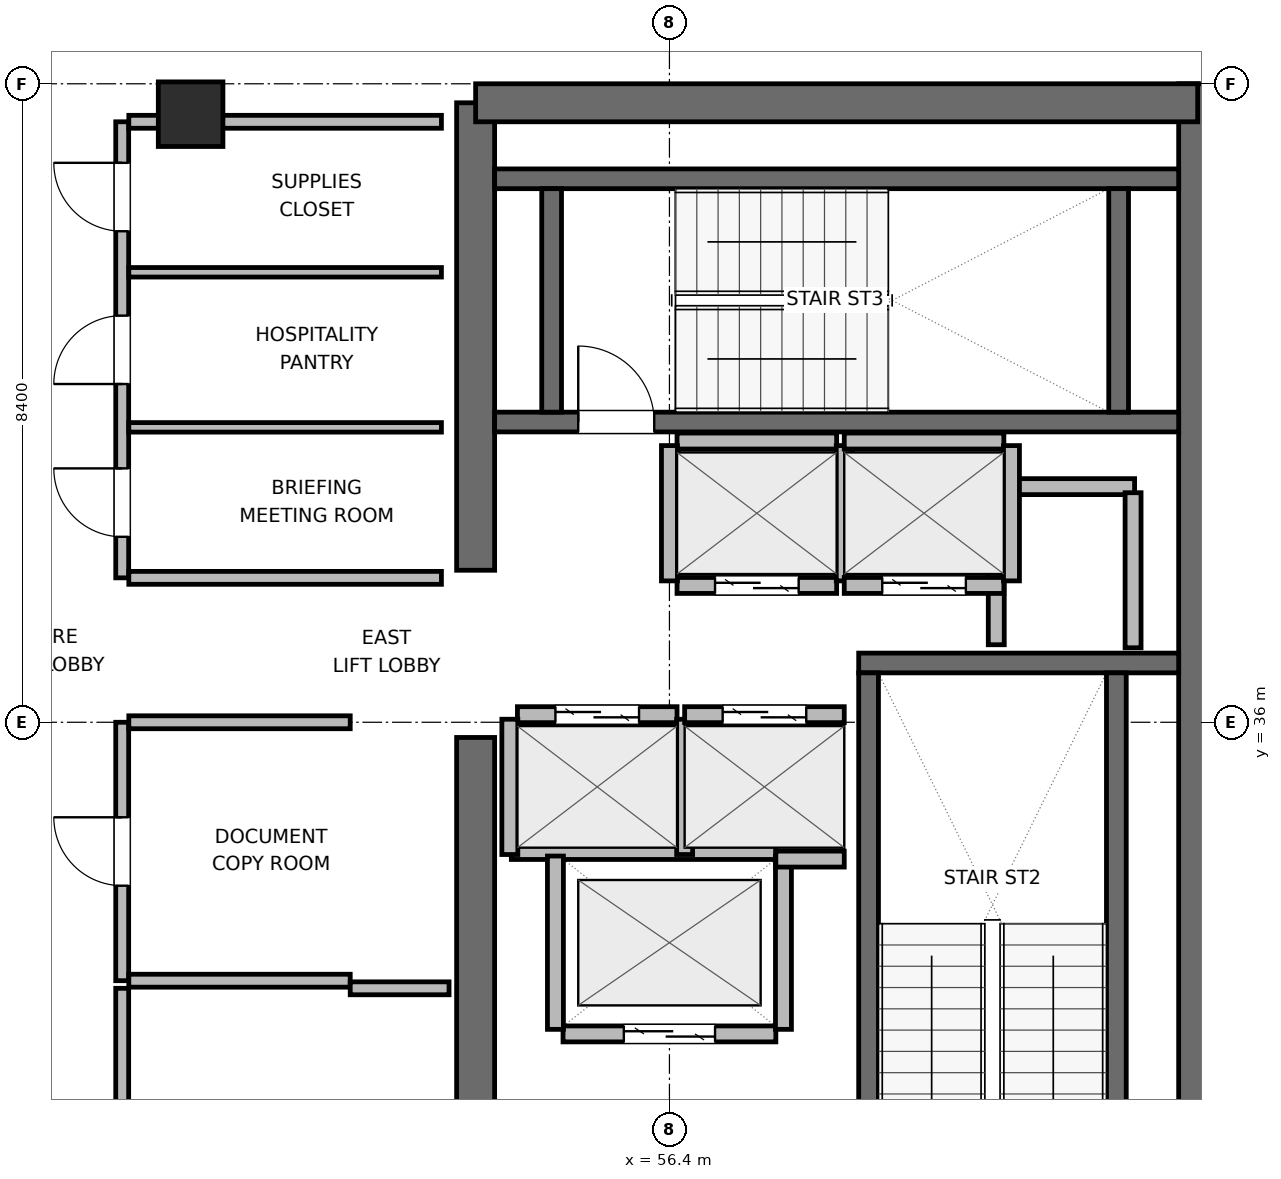
"""IFC4 building model, lengths in metres.
Left out: names, types, materials, properties, quantities, classifications, styles, units other than length and angle.
Written with IfcOpenShell. Run it as: python <this file> out.ifc"""

import sys

from ifc_helpers import new_model, si_unit, direction, frame, frame_2d, origin, origin_2d, place, context, subcontext, project, spatial, rectangle, extrude, element, fill, save


model = new_model("IFC4")
c1 = context("Model", 3, precision=1e-05, world=origin(), true_north=direction((0.0, 1.0)))
c2 = subcontext(c1, "Body", "Model", "MODEL_VIEW")
j1 = project(units=[si_unit("LENGTHUNIT", "METRE"), si_unit("PLANEANGLEUNIT", "RADIAN")], contexts=[c1])
p1 = place(None, origin())
s1 = spatial("IfcSite", under=j1, at=p1, CompositionType="ELEMENT")
p2 = place(p1, origin())
s2 = spatial("IfcBuilding", under=s1, at=p2, CompositionType="ELEMENT")
p3 = place(p2, frame((0.0, 0.0, 302.4)))
s3 = spatial("IfcBuildingStorey", under=s2, at=p3, CompositionType="ELEMENT", Elevation=302.4)
p4 = place(p3, frame((53.85, 27.85, 0.0), z_axis=(0.0, 0.0, 1.0), x_axis=(0.0, 1.0, 0.0)))
e1 = element("IfcWall", 1, at=p4, inside=s3, PredefinedType="SHEAR", context=c2, shape_type="SweptSolid", body=[
    extrude(rectangle(XDim=7.95, YDim=0.5, at=frame_2d((3.975, 0.0))), origin(), (0.0, 0.0, 1.0), 3.9),
])
p5 = place(p3, frame((53.85, 38.0, 0.0), z_axis=(0.0, 0.0, 1.0), x_axis=(0.0, 1.0, 0.0)))
e2 = element("IfcWall", 2, at=p5, inside=s3, PredefinedType="SHEAR", context=c2, shape_type="SweptSolid", body=[
    extrude(rectangle(XDim=6.15, YDim=0.5, at=frame_2d((3.075, 0.0))), origin(), (0.0, 0.0, 1.0), 3.9),
])
p6 = place(p3, frame((63.35, 27.6, 0.0), z_axis=(0.0, 0.0, 1.0), x_axis=(0.0, 1.0, 0.0)))
e3 = element("IfcWall", 3, at=p6, inside=s3, PredefinedType="SHEAR", context=c2, shape_type="SweptSolid", body=[
    extrude(rectangle(XDim=16.8, YDim=0.5, at=frame_2d((8.4, 0.0))), origin(), (0.0, 0.0, 1.0), 3.9),
])
p7 = place(p3, frame((53.85, 44.15, 0.0), z_axis=(0.0, 0.0, 1.0), x_axis=(1.0, 0.0, 0.0)))
e4 = element("IfcWall", 4, at=p7, inside=s3, PredefinedType="SHEAR", context=c2, shape_type="SweptSolid", body=[
    extrude(rectangle(XDim=9.5, YDim=0.5, at=frame_2d((4.75, 0.0))), origin(), (0.0, 0.0, 1.0), 3.9),
])
p8 = place(p3, frame((58.89, 36.78, 0.0), z_axis=(0.0, 0.0, 1.0), x_axis=(1.0, 0.0, 0.0)))
e5 = element("IfcWall", 5, at=p8, inside=s3, PredefinedType="SHEAR", context=c2, shape_type="SweptSolid", body=[
    extrude(rectangle(XDim=4.21, YDim=0.26, at=frame_2d((2.105, 0.0))), origin(), (0.0, 0.0, 1.0), 3.9),
])
p9 = place(p3, frame((59.02, 29.05, 0.0), z_axis=(0.0, 0.0, 1.0), x_axis=(0.0, 1.0, 0.0)))
e6 = element("IfcWall", 6, at=p9, inside=s3, PredefinedType="SHEAR", context=c2, shape_type="SweptSolid", body=[
    extrude(rectangle(XDim=7.6, YDim=0.26, at=frame_2d((3.8, 0.0))), origin(), (0.0, 0.0, 1.0), 3.9),
])
p10 = place(p9, frame((0.3, 0.0, 0.0)))
e7 = element("IfcOpeningElement", 7, at=p10, cuts=e6, PredefinedType="OPENING", context=c2, shape_type="SweptSolid", body=[
    extrude(rectangle(XDim=1.0, YDim=2.04, at=frame_2d((0.5, 1.02))), frame((0.0, 0.14, 0.0), z_axis=(0.0, -1.0, 0.0), x_axis=(1.0, 0.0, 0.0)), (0.0, 0.0, 1.0), 0.28),
])
p11 = place(p3, frame((62.28, 29.05, 0.0), z_axis=(0.0, 0.0, 1.0), x_axis=(0.0, 1.0, 0.0)))
e8 = element("IfcWall", 8, at=p11, inside=s3, PredefinedType="SHEAR", context=c2, shape_type="SweptSolid", body=[
    extrude(rectangle(XDim=7.6, YDim=0.26, at=frame_2d((3.8, 0.0))), origin(), (0.0, 0.0, 1.0), 3.9),
])
p12 = place(p3, frame((54.1, 39.95, 0.0), z_axis=(0.0, 0.0, 1.0), x_axis=(1.0, 0.0, 0.0)))
e9 = element("IfcWall", 9, at=p12, inside=s3, PredefinedType="SHEAR", context=c2, shape_type="SweptSolid", body=[
    extrude(rectangle(XDim=9.0, YDim=0.26, at=frame_2d((4.5, 0.0))), origin(), (0.0, 0.0, 1.0), 3.9),
])
p13 = place(p12, frame((1.1, 0.0, 0.0)))
e10 = element("IfcOpeningElement", 10, at=p13, cuts=e9, PredefinedType="OPENING", context=c2, shape_type="SweptSolid", body=[
    extrude(rectangle(XDim=1.0, YDim=2.04, at=frame_2d((0.5, 1.02))), frame((0.0, 0.14, 0.0), z_axis=(0.0, -1.0, 0.0), x_axis=(1.0, 0.0, 0.0)), (0.0, 0.0, 1.0), 0.28),
])
p14 = place(p3, frame((54.1, 43.15, 0.0), z_axis=(0.0, 0.0, 1.0), x_axis=(1.0, 0.0, 0.0)))
e11 = element("IfcWall", 11, at=p14, inside=s3, PredefinedType="SHEAR", context=c2, shape_type="SweptSolid", body=[
    extrude(rectangle(XDim=9.0, YDim=0.26, at=frame_2d((4.5, 0.0))), origin(), (0.0, 0.0, 1.0), 3.9),
])
for number, where, z_axis, x_axis in (
    (12, (54.85, 40.08, 0.0), (0.0, 0.0, 1.0), (0.0, 1.0, 0.0)),
    (13, (62.31, 40.08, 0.0), (0.0, 0.0, 1.0), (0.0, 1.0, 0.0)),
):
    element("IfcWall", number, at=place(p3, frame(where, z_axis=z_axis, x_axis=x_axis)), inside=s3, PredefinedType="SHEAR", context=c2, shape_type="SweptSolid", body=[
        extrude(rectangle(XDim=2.94, YDim=0.26, at=frame_2d((1.47, 0.0))), origin(), (0.0, 0.0, 1.0), 3.9),
    ])
p15 = place(p3, frame((50.1, 44.0, 0.0), z_axis=(0.0, 0.0, 1.0), x_axis=(1.0, 0.0, 0.0)))
e14 = element("IfcColumn", 14, at=p15, inside=s3, PredefinedType="COLUMN", context=c2, shape_type="SweptSolid", body=[
    extrude(rectangle(XDim=0.85, YDim=0.85, at=origin_2d()), origin(), (0.0, 0.0, 1.0), 3.9),
])
p16 = place(p3, frame((60.72, 39.1, 0.0), z_axis=(0.0, 0.0, 1.0), x_axis=(1.0, 0.0, 0.0)))
e15 = element("IfcWall", 15, at=p16, inside=s3, PredefinedType="PARTITIONING", context=c2, shape_type="SweptSolid", body=[
    extrude(rectangle(XDim=1.8, YDim=0.21, at=frame_2d((0.9, 0.0))), origin(), (0.0, 0.0, 1.0), 3.68),
])
p17 = place(p3, frame((60.7, 37.02, 0.0), z_axis=(0.0, 0.0, 1.0), x_axis=(0.0, 1.0, 0.0)))
e16 = element("IfcWall", 16, at=p17, inside=s3, PredefinedType="PARTITIONING", context=c2, shape_type="SweptSolid", body=[
    extrude(rectangle(XDim=1.96, YDim=0.21, at=frame_2d((0.98, 0.0))), origin(), (0.0, 0.0, 1.0), 3.68),
])
p18 = place(p3, frame((62.5, 36.98, 0.0), z_axis=(0.0, 0.0, 1.0), x_axis=(0.0, 1.0, 0.0)))
e17 = element("IfcWall", 17, at=p18, inside=s3, PredefinedType="PARTITIONING", context=c2, shape_type="SweptSolid", body=[
    extrude(rectangle(XDim=2.04, YDim=0.21, at=frame_2d((1.02, 0.0))), origin(), (0.0, 0.0, 1.0), 3.68),
])
p19 = place(p3, frame((55.0, 31.9, 0.0), z_axis=(0.0, 0.0, 1.0), x_axis=(1.0, 0.0, 0.0)))
e18 = element("IfcWall", 18, at=p19, inside=s3, PredefinedType="PARTITIONING", context=c2, shape_type="SweptSolid", body=[
    extrude(rectangle(XDim=2.8, YDim=0.21, at=frame_2d((1.4, 0.0))), origin(), (0.0, 0.0, 1.0), 3.68),
])
p20 = place(p19, frame((0.8, 0.0, 0.0)))
e19 = element("IfcOpeningElement", 19, at=p20, cuts=e18, PredefinedType="OPENING", context=c2, shape_type="SweptSolid", body=[
    extrude(rectangle(XDim=1.2, YDim=2.04, at=frame_2d((0.6, 1.02))), frame((0.0, 0.115, 0.0), z_axis=(0.0, -1.0, 0.0), x_axis=(1.0, 0.0, 0.0)), (0.0, 0.0, 1.0), 0.23),
])
p21 = place(p3, frame((54.32, 34.3, 0.0), z_axis=(0.0, 0.0, 1.0), x_axis=(1.0, 0.0, 0.0)))
e20 = element("IfcWall", 20, at=p21, inside=s3, PredefinedType="PARTITIONING", context=c2, shape_type="SweptSolid", body=[
    extrude(rectangle(XDim=3.48, YDim=0.21, at=frame_2d((1.74, 0.0))), origin(), (0.0, 0.0, 1.0), 3.68),
])
for number, where, z_axis, x_axis in (
    (21, (54.9, 31.96, 0.0), (0.0, 0.0, 1.0), (0.0, 1.0, 0.0)),
    (22, (57.9, 31.96, 0.0), (0.0, 0.0, 1.0), (0.0, 1.0, 0.0)),
):
    element("IfcWall", number, at=place(p3, frame(where, z_axis=z_axis, x_axis=x_axis)), inside=s3, PredefinedType="PARTITIONING", context=c2, shape_type="SweptSolid", body=[
        extrude(rectangle(XDim=2.28, YDim=0.21, at=frame_2d((1.14, 0.0))), origin(), (0.0, 0.0, 1.0), 3.68),
    ])
p22 = place(p3, frame((54.4, 36.1, 0.0), z_axis=(0.0, 0.0, 1.0), x_axis=(1.0, 0.0, 0.0)))
e23 = element("IfcWall", 23, at=p22, inside=s3, PredefinedType="PARTITIONING", context=c2, shape_type="SweptSolid", body=[
    extrude(rectangle(XDim=2.1, YDim=0.21, at=frame_2d((1.05, 0.0))), origin(), (0.0, 0.0, 1.0), 3.68),
])
p23 = place(p22, frame((0.5, 0.0, 0.0)))
e24 = element("IfcOpeningElement", 24, at=p23, cuts=e23, PredefinedType="OPENING", context=c2, shape_type="SweptSolid", body=[
    extrude(rectangle(XDim=1.1, YDim=2.04, at=frame_2d((0.55, 1.02))), frame((0.0, 0.115, 0.0), z_axis=(0.0, -1.0, 0.0), x_axis=(1.0, 0.0, 0.0)), (0.0, 0.0, 1.0), 0.23),
])
for number, where, z_axis, x_axis in (
    (25, (54.3, 34.26, 0.0), (0.0, 0.0, 1.0), (0.0, 1.0, 0.0)),
    (26, (56.6, 34.26, 0.0), (0.0, 0.0, 1.0), (0.0, 1.0, 0.0)),
):
    element("IfcWall", number, at=place(p3, frame(where, z_axis=z_axis, x_axis=x_axis)), inside=s3, PredefinedType="PARTITIONING", context=c2, shape_type="SweptSolid", body=[
        extrude(rectangle(XDim=1.78, YDim=0.21, at=frame_2d((0.89, 0.0))), origin(), (0.0, 0.0, 1.0), 3.68),
    ])
p24 = place(p3, frame((56.6, 36.1, 0.0), z_axis=(0.0, 0.0, 1.0), x_axis=(1.0, 0.0, 0.0)))
e27 = element("IfcWall", 27, at=p24, inside=s3, PredefinedType="PARTITIONING", context=c2, shape_type="SweptSolid", body=[
    extrude(rectangle(XDim=2.1, YDim=0.21, at=frame_2d((1.05, 0.0))), origin(), (0.0, 0.0, 1.0), 3.68),
])
p25 = place(p24, frame((0.5, 0.0, 0.0)))
e28 = element("IfcOpeningElement", 28, at=p25, cuts=e27, PredefinedType="OPENING", context=c2, shape_type="SweptSolid", body=[
    extrude(rectangle(XDim=1.1, YDim=2.04, at=frame_2d((0.55, 1.02))), frame((0.0, 0.115, 0.0), z_axis=(0.0, -1.0, 0.0), x_axis=(1.0, 0.0, 0.0)), (0.0, 0.0, 1.0), 0.23),
])
p26 = place(p3, frame((57.8, 34.2, 0.0), z_axis=(0.0, 0.0, 1.0), x_axis=(1.0, 0.0, 0.0)))
e29 = element("IfcWall", 29, at=p26, inside=s3, PredefinedType="PARTITIONING", context=c2, shape_type="SweptSolid", body=[
    extrude(rectangle(XDim=0.9, YDim=0.21, at=frame_2d((0.45, 0.0))), origin(), (0.0, 0.0, 1.0), 3.68),
])
p27 = place(p3, frame((56.5, 37.8, 0.0), z_axis=(0.0, 0.0, 1.0), x_axis=(1.0, 0.0, 0.0)))
e30 = element("IfcWall", 30, at=p27, inside=s3, PredefinedType="PARTITIONING", context=c2, shape_type="SweptSolid", body=[
    extrude(rectangle(XDim=2.1, YDim=0.21, at=frame_2d((1.05, 0.0))), origin(), (0.0, 0.0, 1.0), 3.68),
])
p28 = place(p27, frame((0.5, 0.0, 0.0)))
e31 = element("IfcOpeningElement", 31, at=p28, cuts=e30, PredefinedType="OPENING", context=c2, shape_type="SweptSolid", body=[
    extrude(rectangle(XDim=1.1, YDim=2.04, at=frame_2d((0.55, 1.02))), frame((0.0, 0.115, 0.0), z_axis=(0.0, -1.0, 0.0), x_axis=(1.0, 0.0, 0.0)), (0.0, 0.0, 1.0), 0.23),
])
p29 = place(p3, frame((56.5, 39.7, 0.0), z_axis=(0.0, 0.0, 1.0), x_axis=(1.0, 0.0, 0.0)))
e32 = element("IfcWall", 32, at=p29, inside=s3, PredefinedType="PARTITIONING", context=c2, shape_type="SweptSolid", body=[
    extrude(rectangle(XDim=2.1, YDim=0.21, at=frame_2d((1.05, 0.0))), origin(), (0.0, 0.0, 1.0), 3.68),
])
for number, where, z_axis, x_axis in (
    (33, (56.4, 37.86, 0.0), (0.0, 0.0, 1.0), (0.0, 1.0, 0.0)),
    (34, (58.7, 37.86, 0.0), (0.0, 0.0, 1.0), (0.0, 1.0, 0.0)),
):
    element("IfcWall", number, at=place(p3, frame(where, z_axis=z_axis, x_axis=x_axis)), inside=s3, PredefinedType="PARTITIONING", context=c2, shape_type="SweptSolid", body=[
        extrude(rectangle(XDim=1.78, YDim=0.21, at=frame_2d((0.89, 0.0))), origin(), (0.0, 0.0, 1.0), 3.68),
    ])
p30 = place(p3, frame((58.7, 37.8, 0.0), z_axis=(0.0, 0.0, 1.0), x_axis=(1.0, 0.0, 0.0)))
e35 = element("IfcWall", 35, at=p30, inside=s3, PredefinedType="PARTITIONING", context=c2, shape_type="SweptSolid", body=[
    extrude(rectangle(XDim=2.1, YDim=0.21, at=frame_2d((1.05, 0.0))), origin(), (0.0, 0.0, 1.0), 3.68),
])
p31 = place(p30, frame((0.5, 0.0, 0.0)))
e36 = element("IfcOpeningElement", 36, at=p31, cuts=e35, PredefinedType="OPENING", context=c2, shape_type="SweptSolid", body=[
    extrude(rectangle(XDim=1.1, YDim=2.04, at=frame_2d((0.55, 1.02))), frame((0.0, 0.115, 0.0), z_axis=(0.0, -1.0, 0.0), x_axis=(1.0, 0.0, 0.0)), (0.0, 0.0, 1.0), 0.23),
])
p32 = place(p3, frame((58.7, 39.7, 0.0), z_axis=(0.0, 0.0, 1.0), x_axis=(1.0, 0.0, 0.0)))
e37 = element("IfcWall", 37, at=p32, inside=s3, PredefinedType="PARTITIONING", context=c2, shape_type="SweptSolid", body=[
    extrude(rectangle(XDim=2.1, YDim=0.21, at=frame_2d((1.05, 0.0))), origin(), (0.0, 0.0, 1.0), 3.68),
])
p33 = place(p3, frame((60.9, 37.86, 0.0), z_axis=(0.0, 0.0, 1.0), x_axis=(0.0, 1.0, 0.0)))
e38 = element("IfcWall", 38, at=p33, inside=s3, PredefinedType="PARTITIONING", context=c2, shape_type="SweptSolid", body=[
    extrude(rectangle(XDim=1.78, YDim=0.21, at=frame_2d((0.89, 0.0))), origin(), (0.0, 0.0, 1.0), 3.68),
])
p34 = place(p3, frame((49.2, 32.6, 0.0), z_axis=(0.0, 0.0, 1.0), x_axis=(0.0, 1.0, 0.0)))
e39 = element("IfcWall", 39, at=p34, inside=s3, PredefinedType="PARTITIONING", context=c2, shape_type="SweptSolid", body=[
    extrude(rectangle(XDim=3.4, YDim=0.17, at=frame_2d((1.7, 0.0))), origin(), (0.0, 0.0, 1.0), 3.68),
])
p35 = place(p34, frame((1.25, 0.0, 0.0)))
e40 = element("IfcOpeningElement", 40, at=p35, cuts=e39, PredefinedType="OPENING", context=c2, shape_type="SweptSolid", body=[
    extrude(rectangle(XDim=0.9, YDim=2.02, at=frame_2d((0.45, 1.01))), frame((0.0, 0.095, 0.0), z_axis=(0.0, -1.0, 0.0), x_axis=(1.0, 0.0, 0.0)), (0.0, 0.0, 1.0), 0.19),
])
for number, where, z_axis, x_axis in (
    (41, (49.287, 32.6, 0.0), (0.0, 0.0, 1.0), (1.0, 0.0, 0.0)),
    (42, (49.287, 36.0, 0.0), (0.0, 0.0, 1.0), (1.0, 0.0, 0.0)),
):
    element("IfcWall", number, at=place(p3, frame(where, z_axis=z_axis, x_axis=x_axis)), inside=s3, PredefinedType="PARTITIONING", context=c2, shape_type="SweptSolid", body=[
        extrude(rectangle(XDim=2.913, YDim=0.17, at=frame_2d((1.457, 0.0))), origin(), (0.0, 0.0, 1.0), 3.68),
    ])
p36 = place(p3, frame((49.2, 28.0, 0.0), z_axis=(0.0, 0.0, 1.0), x_axis=(0.0, 1.0, 0.0)))
e43 = element("IfcWall", 43, at=p36, inside=s3, PredefinedType="PARTITIONING", context=c2, shape_type="SweptSolid", body=[
    extrude(rectangle(XDim=4.5, YDim=0.17, at=frame_2d((2.25, 0.0))), origin(), (0.0, 0.0, 1.0), 3.68),
])
p37 = place(p36, frame((1.8, 0.0, 0.0)))
e44 = element("IfcOpeningElement", 44, at=p37, cuts=e43, PredefinedType="OPENING", context=c2, shape_type="SweptSolid", body=[
    extrude(rectangle(XDim=0.9, YDim=2.02, at=frame_2d((0.45, 1.01))), frame((0.0, 0.095, 0.0), z_axis=(0.0, -1.0, 0.0), x_axis=(1.0, 0.0, 0.0)), (0.0, 0.0, 1.0), 0.19),
])
p38 = place(p3, frame((52.2, 32.5, 0.0), z_axis=(0.0, 0.0, 1.0), x_axis=(1.0, 0.0, 0.0)))
e45 = element("IfcWall", 45, at=p38, inside=s3, PredefinedType="PARTITIONING", context=c2, shape_type="SweptSolid", body=[
    extrude(rectangle(XDim=1.3, YDim=0.17, at=frame_2d((0.65, 0.0))), origin(), (0.0, 0.0, 1.0), 3.68),
])
p39 = place(p3, frame((49.2, 37.9, 0.0), z_axis=(0.0, 0.0, 1.0), x_axis=(0.0, 1.0, 0.0)))
e46 = element("IfcWall", 46, at=p39, inside=s3, PredefinedType="PARTITIONING", context=c2, shape_type="SweptSolid", body=[
    extrude(rectangle(XDim=6.0, YDim=0.17, at=frame_2d((3.0, 0.0))), origin(), (0.0, 0.0, 1.0), 3.68),
])
p40 = place(p39, frame((0.54, 0.0, 0.0)))
e47 = element("IfcOpeningElement", 47, at=p40, cuts=e46, PredefinedType="OPENING", context=c2, shape_type="SweptSolid", body=[
    extrude(rectangle(XDim=0.9, YDim=2.02, at=frame_2d((0.45, 1.01))), frame((0.0, 0.095, 0.0), z_axis=(0.0, -1.0, 0.0), x_axis=(1.0, 0.0, 0.0)), (0.0, 0.0, 1.0), 0.19),
])
p41 = place(p39, frame((2.55, 0.0, 0.0)))
e48 = element("IfcOpeningElement", 48, at=p41, cuts=e46, PredefinedType="OPENING", context=c2, shape_type="SweptSolid", body=[
    extrude(rectangle(XDim=0.9, YDim=2.02, at=frame_2d((0.45, 1.01))), frame((0.0, 0.095, 0.0), z_axis=(0.0, -1.0, 0.0), x_axis=(1.0, 0.0, 0.0)), (0.0, 0.0, 1.0), 0.19),
])
p42 = place(p39, frame((4.56, 0.0, 0.0)))
e49 = element("IfcOpeningElement", 49, at=p42, cuts=e46, PredefinedType="OPENING", context=c2, shape_type="SweptSolid", body=[
    extrude(rectangle(XDim=0.9, YDim=2.02, at=frame_2d((0.45, 1.01))), frame((0.0, 0.095, 0.0), z_axis=(0.0, -1.0, 0.0), x_axis=(1.0, 0.0, 0.0)), (0.0, 0.0, 1.0), 0.19),
])
p43 = place(p3, frame((49.287, 37.9, 0.0), z_axis=(0.0, 0.0, 1.0), x_axis=(1.0, 0.0, 0.0)))
e50 = element("IfcWall", 50, at=p43, inside=s3, PredefinedType="PARTITIONING", context=c2, shape_type="SweptSolid", body=[
    extrude(rectangle(XDim=4.113, YDim=0.17, at=frame_2d((2.056, 0.0))), origin(), (0.0, 0.0, 1.0), 3.68),
])
p44 = place(p3, frame((49.287, 43.9, 0.0), z_axis=(0.0, 0.0, 1.0), x_axis=(1.0, 0.0, 0.0)))
e51 = element("IfcWall", 51, at=p44, inside=s3, PredefinedType="PARTITIONING", context=c2, shape_type="SweptSolid", body=[
    extrude(rectangle(XDim=4.113, YDim=0.17, at=frame_2d((2.056, 0.0))), origin(), (0.0, 0.0, 1.0), 2.765),
])
for number, where, z_axis, x_axis in (
    (52, (49.287, 39.88, 0.0), (0.0, 0.0, 1.0), (1.0, 0.0, 0.0)),
    (53, (49.287, 41.92, 0.0), (0.0, 0.0, 1.0), (1.0, 0.0, 0.0)),
):
    element("IfcWall", number, at=place(p3, frame(where, z_axis=z_axis, x_axis=x_axis)), inside=s3, PredefinedType="PARTITIONING", context=c2, shape_type="SweptSolid", body=[
        extrude(rectangle(XDim=4.113, YDim=0.125, at=frame_2d((2.056, 0.0))), origin(), (0.0, 0.0, 1.0), 3.68),
    ])
p45 = place(p13, origin())
e54 = element("IfcDoor", 54, at=p45, inside=s3, OperationType="SINGLE_SWING_LEFT", PredefinedType="DOOR", context=c2, shape_type="SweptSolid", body=[
    extrude(rectangle(XDim=1.0, YDim=2.04, at=frame_2d((0.5, 1.02))), frame((0.0, 0.025, 0.0), z_axis=(0.0, -1.0, 0.0), x_axis=(1.0, 0.0, 0.0)), (0.0, 0.0, 1.0), 0.05),
])
fill(e10, e54)
p46 = place(p20, origin())
e55 = element("IfcDoor", 55, at=p46, inside=s3, OperationType="DOUBLE_DOOR_SLIDING", PredefinedType="DOOR", context=c2, shape_type="SweptSolid", body=[
    extrude(rectangle(XDim=1.2, YDim=2.04, at=frame_2d((0.6, 1.02))), frame((0.0, 0.025, 0.0), z_axis=(0.0, -1.0, 0.0), x_axis=(1.0, 0.0, 0.0)), (0.0, 0.0, 1.0), 0.05),
])
fill(e19, e55)
p47 = place(p23, origin())
e56 = element("IfcDoor", 56, at=p47, inside=s3, OperationType="DOUBLE_DOOR_SLIDING", PredefinedType="DOOR", context=c2, shape_type="SweptSolid", body=[
    extrude(rectangle(XDim=1.1, YDim=2.04, at=frame_2d((0.55, 1.02))), frame((0.0, 0.025, 0.0), z_axis=(0.0, -1.0, 0.0), x_axis=(1.0, 0.0, 0.0)), (0.0, 0.0, 1.0), 0.05),
])
fill(e24, e56)
p48 = place(p25, origin())
e57 = element("IfcDoor", 57, at=p48, inside=s3, OperationType="DOUBLE_DOOR_SLIDING", PredefinedType="DOOR", context=c2, shape_type="SweptSolid", body=[
    extrude(rectangle(XDim=1.1, YDim=2.04, at=frame_2d((0.55, 1.02))), frame((0.0, 0.025, 0.0), z_axis=(0.0, -1.0, 0.0), x_axis=(1.0, 0.0, 0.0)), (0.0, 0.0, 1.0), 0.05),
])
fill(e28, e57)
p49 = place(p28, origin())
e58 = element("IfcDoor", 58, at=p49, inside=s3, OperationType="DOUBLE_DOOR_SLIDING", PredefinedType="DOOR", context=c2, shape_type="SweptSolid", body=[
    extrude(rectangle(XDim=1.1, YDim=2.04, at=frame_2d((0.55, 1.02))), frame((0.0, 0.025, 0.0), z_axis=(0.0, -1.0, 0.0), x_axis=(1.0, 0.0, 0.0)), (0.0, 0.0, 1.0), 0.05),
])
fill(e31, e58)
p50 = place(p31, origin())
e59 = element("IfcDoor", 59, at=p50, inside=s3, OperationType="DOUBLE_DOOR_SLIDING", PredefinedType="DOOR", context=c2, shape_type="SweptSolid", body=[
    extrude(rectangle(XDim=1.1, YDim=2.04, at=frame_2d((0.55, 1.02))), frame((0.0, 0.025, 0.0), z_axis=(0.0, -1.0, 0.0), x_axis=(1.0, 0.0, 0.0)), (0.0, 0.0, 1.0), 0.05),
])
fill(e36, e59)
p51 = place(p35, origin())
e60 = element("IfcDoor", 60, at=p51, inside=s3, OperationType="SINGLE_SWING_RIGHT", PredefinedType="DOOR", context=c2, shape_type="SweptSolid", body=[
    extrude(rectangle(XDim=0.9, YDim=2.02, at=frame_2d((0.45, 1.01))), frame((0.0, 0.025, 0.0), z_axis=(0.0, -1.0, 0.0), x_axis=(1.0, 0.0, 0.0)), (0.0, 0.0, 1.0), 0.05),
])
fill(e40, e60)
p52 = place(p40, origin())
e61 = element("IfcDoor", 61, at=p52, inside=s3, OperationType="SINGLE_SWING_RIGHT", PredefinedType="DOOR", context=c2, shape_type="SweptSolid", body=[
    extrude(rectangle(XDim=0.9, YDim=2.02, at=frame_2d((0.45, 1.01))), frame((0.0, 0.025, 0.0), z_axis=(0.0, -1.0, 0.0), x_axis=(1.0, 0.0, 0.0)), (0.0, 0.0, 1.0), 0.05),
])
fill(e47, e61)
p53 = place(p41, origin())
e62 = element("IfcDoor", 62, at=p53, inside=s3, OperationType="SINGLE_SWING_LEFT", PredefinedType="DOOR", context=c2, shape_type="SweptSolid", body=[
    extrude(rectangle(XDim=0.9, YDim=2.02, at=frame_2d((0.45, 1.01))), frame((0.0, 0.025, 0.0), z_axis=(0.0, -1.0, 0.0), x_axis=(1.0, 0.0, 0.0)), (0.0, 0.0, 1.0), 0.05),
])
fill(e48, e62)
p54 = place(p42, origin())
e63 = element("IfcDoor", 63, at=p54, inside=s3, OperationType="SINGLE_SWING_RIGHT", PredefinedType="DOOR", context=c2, shape_type="SweptSolid", body=[
    extrude(rectangle(XDim=0.9, YDim=2.02, at=frame_2d((0.45, 1.01))), frame((0.0, 0.025, 0.0), z_axis=(0.0, -1.0, 0.0), x_axis=(1.0, 0.0, 0.0)), (0.0, 0.0, 1.0), 0.05),
])
fill(e49, e63)
save(model, sys.argv[1])
